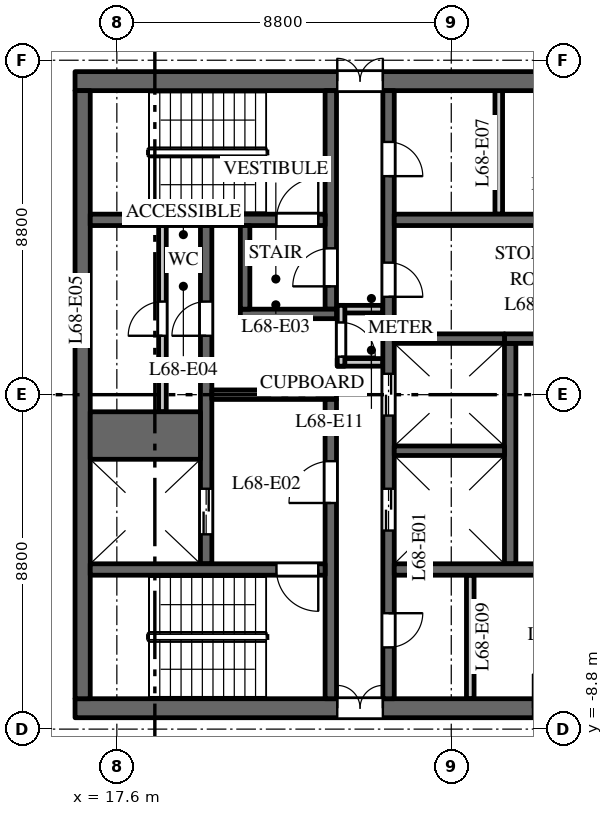
"""IFC4 building model, lengths in metres.
Left out: names, types, materials, properties, quantities, classifications, styles, units other than length and angle.
Written with IfcOpenShell. Run it as: python <this file> out.ifc"""

import sys

from ifc_helpers import new_model, si_unit, direction, frame, frame_2d, origin, place, context, subcontext, project, spatial, rectangle, extrude, element, fill, save


model = new_model("IFC4")
c1 = context("Model", 3, precision=1e-05, world=origin(), true_north=direction((0.0, 1.0)))
c2 = subcontext(c1, "Body", "Model", "MODEL_VIEW")
j1 = project(units=[si_unit("LENGTHUNIT", "METRE"), si_unit("PLANEANGLEUNIT", "RADIAN")], contexts=[c1])
p1 = place(None, origin())
s1 = spatial("IfcSite", under=j1, at=p1, CompositionType="ELEMENT")
p2 = place(p1, origin())
s2 = spatial("IfcBuilding", under=s1, at=p2, CompositionType="ELEMENT")
p3 = place(p2, frame((0.0, 0.0, 315.0)))
s3 = spatial("IfcBuildingStorey", under=s2, at=p3, CompositionType="ELEMENT", Elevation=315.0)
p4 = place(p3, frame((16.5, 8.25, 0.0), z_axis=(0.0, 0.0, 1.0), x_axis=(1.0, 0.0, 0.0)))
e1 = element("IfcWall", 1, at=p4, inside=s3, PredefinedType="SHEAR", context=c2, shape_type="SweptSolid", body=[
    extrude(rectangle(XDim=15.0, YDim=0.5, at=frame_2d((7.5, 0.0))), origin(), (0.0, 0.0, 1.0), 3.7),
])
p5 = place(p4, frame((6.9, 0.0, 0.0)))
e2 = element("IfcOpeningElement", 2, at=p5, cuts=e1, PredefinedType="OPENING", context=c2, shape_type="SweptSolid", body=[
    extrude(rectangle(XDim=1.2, YDim=2.1, at=frame_2d((0.6, 1.05))), frame((0.0, 0.26, 0.0), z_axis=(0.0, -1.0, 0.0), x_axis=(1.0, 0.0, 0.0)), (0.0, 0.0, 1.0), 0.52),
])
p6 = place(p4, frame((12.425, 0.0, 0.0)))
e3 = element("IfcOpeningElement", 3, at=p6, cuts=e1, PredefinedType="OPENING", context=c2, shape_type="SweptSolid", body=[
    extrude(rectangle(XDim=0.9, YDim=2.1, at=frame_2d((0.45, 1.05))), frame((0.0, 0.26, 0.0), z_axis=(0.0, -1.0, 0.0), x_axis=(1.0, 0.0, 0.0)), (0.0, 0.0, 1.0), 0.52),
])
p7 = place(p3, frame((16.5, -8.25, 0.0), z_axis=(0.0, 0.0, 1.0), x_axis=(1.0, 0.0, 0.0)))
e4 = element("IfcWall", 4, at=p7, inside=s3, PredefinedType="SHEAR", context=c2, shape_type="SweptSolid", body=[
    extrude(rectangle(XDim=15.0, YDim=0.5, at=frame_2d((7.5, 0.0))), origin(), (0.0, 0.0, 1.0), 3.7),
])
p8 = place(p7, frame((6.9, 0.0, 0.0)))
e5 = element("IfcOpeningElement", 5, at=p8, cuts=e4, PredefinedType="OPENING", context=c2, shape_type="SweptSolid", body=[
    extrude(rectangle(XDim=1.2, YDim=2.1, at=frame_2d((0.6, 1.05))), frame((0.0, 0.26, 0.0), z_axis=(0.0, -1.0, 0.0), x_axis=(1.0, 0.0, 0.0)), (0.0, 0.0, 1.0), 0.52),
])
p9 = place(p7, frame((12.05, 0.0, 0.0)))
e6 = element("IfcOpeningElement", 6, at=p9, cuts=e4, PredefinedType="OPENING", context=c2, shape_type="SweptSolid", body=[
    extrude(rectangle(XDim=0.9, YDim=2.1, at=frame_2d((0.45, 1.05))), frame((0.0, 0.26, 0.0), z_axis=(0.0, -1.0, 0.0), x_axis=(1.0, 0.0, 0.0)), (0.0, 0.0, 1.0), 0.52),
])
p10 = place(p3, frame((18.8, -0.45, 0.0), z_axis=(0.0, 0.0, 1.0), x_axis=(0.0, 1.0, 0.0)))
e7 = element("IfcWall", 7, at=p10, inside=s3, PredefinedType="PARTITIONING", context=c2, shape_type="SweptSolid", body=[
    extrude(rectangle(XDim=4.9, YDim=0.2, at=frame_2d((2.45, 0.0))), origin(), (0.0, 0.0, 1.0), 3.7),
])
p11 = place(p10, frame((2.0, 0.0, 0.0)))
e8 = element("IfcOpeningElement", 8, at=p11, cuts=e7, PredefinedType="OPENING", context=c2, shape_type="SweptSolid", body=[
    extrude(rectangle(XDim=0.9, YDim=2.1, at=frame_2d((0.45, 1.05))), frame((0.0, 0.11, 0.0), z_axis=(0.0, -1.0, 0.0), x_axis=(1.0, 0.0, 0.0)), (0.0, 0.0, 1.0), 0.22),
])
p12 = place(p3, frame((27.95, -4.45, 0.0), z_axis=(0.0, 0.0, 1.0), x_axis=(0.0, 1.0, 0.0)))
e9 = element("IfcWall", 9, at=p12, inside=s3, PredefinedType="SHEAR", context=c2, shape_type="SweptSolid", body=[
    extrude(rectangle(XDim=5.8, YDim=0.3, at=frame_2d((2.9, 0.0))), origin(), (0.0, 0.0, 1.0), 3.7),
])
p13 = place(p3, frame((27.8, 1.475, 0.0), z_axis=(0.0, 0.0, 1.0), x_axis=(1.0, 0.0, 0.0)))
e10 = element("IfcWall", 10, at=p13, inside=s3, PredefinedType="SHEAR", context=c2, shape_type="SweptSolid", body=[
    extrude(rectangle(XDim=3.2, YDim=0.25, at=frame_2d((1.6, 0.0))), origin(), (0.0, 0.0, 1.0), 3.7),
])
p14 = place(p3, frame((19.95, -4.45, 0.0), z_axis=(0.0, 0.0, 1.0), x_axis=(0.0, 1.0, 0.0)))
e11 = element("IfcWall", 11, at=p14, inside=s3, PredefinedType="SHEAR", context=c2, shape_type="SweptSolid", body=[
    extrude(rectangle(XDim=8.9, YDim=0.3, at=frame_2d((4.45, 0.0))), origin(), (0.0, 0.0, 1.0), 3.7),
])
p15 = place(p14, frame((0.775, 0.0, 0.0)))
e12 = element("IfcOpeningElement", 12, at=p15, cuts=e11, PredefinedType="OPENING", context=c2, shape_type="SweptSolid", body=[
    extrude(rectangle(XDim=1.2, YDim=2.1, at=frame_2d((0.6, 1.05))), frame((0.0, 0.16, 0.0), z_axis=(0.0, -1.0, 0.0), x_axis=(1.0, 0.0, 0.0)), (0.0, 0.0, 1.0), 0.32),
])
p16 = place(p14, frame((6.0, 0.0, 0.0)))
e13 = element("IfcOpeningElement", 13, at=p16, cuts=e11, PredefinedType="OPENING", context=c2, shape_type="SweptSolid", body=[
    extrude(rectangle(XDim=0.9, YDim=2.1, at=frame_2d((0.45, 1.05))), frame((0.0, 0.16, 0.0), z_axis=(0.0, -1.0, 0.0), x_axis=(1.0, 0.0, 0.0)), (0.0, 0.0, 1.0), 0.32),
])
p17 = place(p3, frame((24.75, -8.0, 0.0), z_axis=(0.0, 0.0, 1.0), x_axis=(0.0, 1.0, 0.0)))
e14 = element("IfcWall", 14, at=p17, inside=s3, PredefinedType="SHEAR", context=c2, shape_type="SweptSolid", body=[
    extrude(rectangle(XDim=16.0, YDim=0.3, at=frame_2d((8.0, 0.0))), origin(), (0.0, 0.0, 1.0), 3.7),
])
p18 = place(p17, frame((4.425, 0.0, 0.0)))
e15 = element("IfcOpeningElement", 15, at=p18, cuts=e14, PredefinedType="OPENING", context=c2, shape_type="SweptSolid", body=[
    extrude(rectangle(XDim=1.1, YDim=2.1, at=frame_2d((0.55, 1.05))), frame((0.0, 0.16, 0.0), z_axis=(0.0, -1.0, 0.0), x_axis=(1.0, 0.0, 0.0)), (0.0, 0.0, 1.0), 0.32),
])
p19 = place(p17, frame((7.45, 0.0, 0.0)))
e16 = element("IfcOpeningElement", 16, at=p19, cuts=e14, PredefinedType="OPENING", context=c2, shape_type="SweptSolid", body=[
    extrude(rectangle(XDim=1.1, YDim=2.1, at=frame_2d((0.55, 1.05))), frame((0.0, 0.16, 0.0), z_axis=(0.0, -1.0, 0.0), x_axis=(1.0, 0.0, 0.0)), (0.0, 0.0, 1.0), 0.32),
])
p20 = place(p17, frame((10.575, 0.0, 0.0)))
e17 = element("IfcOpeningElement", 17, at=p20, cuts=e14, PredefinedType="OPENING", context=c2, shape_type="SweptSolid", body=[
    extrude(rectangle(XDim=0.9, YDim=2.1, at=frame_2d((0.45, 1.05))), frame((0.0, 0.16, 0.0), z_axis=(0.0, -1.0, 0.0), x_axis=(1.0, 0.0, 0.0)), (0.0, 0.0, 1.0), 0.32),
])
p21 = place(p17, frame((13.75, 0.0, 0.0)))
e18 = element("IfcOpeningElement", 18, at=p21, cuts=e14, PredefinedType="OPENING", context=c2, shape_type="SweptSolid", body=[
    extrude(rectangle(XDim=0.9, YDim=2.1, at=frame_2d((0.45, 1.05))), frame((0.0, 0.16, 0.0), z_axis=(0.0, -1.0, 0.0), x_axis=(1.0, 0.0, 0.0)), (0.0, 0.0, 1.0), 0.32),
])
p22 = place(p17, frame((1.35, 0.0, 0.0)))
e19 = element("IfcOpeningElement", 19, at=p22, cuts=e14, PredefinedType="OPENING", context=c2, shape_type="SweptSolid", body=[
    extrude(rectangle(XDim=0.9, YDim=2.1, at=frame_2d((0.45, 1.05))), frame((0.0, 0.16, 0.0), z_axis=(0.0, -1.0, 0.0), x_axis=(1.0, 0.0, 0.0)), (0.0, 0.0, 1.0), 0.32),
])
p23 = place(p3, frame((20.1, 0.0, 0.0), z_axis=(0.0, 0.0, 1.0), x_axis=(1.0, 0.0, 0.0)))
e20 = element("IfcWall", 20, at=p23, inside=s3, PredefinedType="SHEAR", context=c2, shape_type="SweptSolid", body=[
    extrude(rectangle(XDim=3.28, YDim=0.25, at=frame_2d((1.64, 0.0))), origin(), (0.0, 0.0, 1.0), 3.7),
])
p24 = place(p3, frame((16.7, -8.0, 0.0), z_axis=(0.0, 0.0, 1.0), x_axis=(0.0, 1.0, 0.0)))
e21 = element("IfcWall", 21, at=p24, inside=s3, PredefinedType="SHEAR", context=c2, shape_type="SweptSolid", body=[
    extrude(rectangle(XDim=16.0, YDim=0.4, at=frame_2d((8.0, 0.0))), origin(), (0.0, 0.0, 1.0), 3.7),
])
for number, where, z_axis, x_axis in (
    (22, (23.4, 0.85, 0.0), (0.0, 0.0, 1.0), (1.0, 0.0, 0.0)),
    (23, (23.4, 2.25, 0.0), (0.0, 0.0, 1.0), (1.0, 0.0, 0.0)),
):
    element("IfcWall", number, at=place(p3, frame(where, z_axis=z_axis, x_axis=x_axis)), inside=s3, PredefinedType="PARTITIONING", context=c2, shape_type="SweptSolid", body=[
        extrude(rectangle(XDim=1.2, YDim=0.2, at=frame_2d((0.6, 0.0))), origin(), (0.0, 0.0, 1.0), 3.7),
    ])
p25 = place(p3, frame((23.5, 0.75, 0.0), z_axis=(0.0, 0.0, 1.0), x_axis=(0.0, 1.0, 0.0)))
e24 = element("IfcWall", 24, at=p25, inside=s3, PredefinedType="PARTITIONING", context=c2, shape_type="SweptSolid", body=[
    extrude(rectangle(XDim=1.6, YDim=0.2, at=frame_2d((0.8, 0.0))), origin(), (0.0, 0.0, 1.0), 3.7),
])
p26 = place(p25, frame((0.25, 0.0, 0.0)))
e25 = element("IfcOpeningElement", 25, at=p26, cuts=e24, PredefinedType="OPENING", context=c2, shape_type="SweptSolid", body=[
    extrude(rectangle(XDim=0.9, YDim=2.1, at=frame_2d((0.45, 1.05))), frame((0.0, 0.11, 0.0), z_axis=(0.0, -1.0, 0.0), x_axis=(1.0, 0.0, 0.0)), (0.0, 0.0, 1.0), 0.22),
])
p27 = place(p3, frame((24.9, 4.6, 0.0), z_axis=(0.0, 0.0, 1.0), x_axis=(1.0, 0.0, 0.0)))
e26 = element("IfcWall", 26, at=p27, inside=s3, PredefinedType="SHEAR", context=c2, shape_type="SweptSolid", body=[
    extrude(rectangle(XDim=6.1, YDim=0.3, at=frame_2d((3.05, 0.0))), origin(), (0.0, 0.0, 1.0), 3.7),
])
for number, where, z_axis, x_axis in (
    (27, (27.65, 4.75, 0.0), (0.0, 0.0, 1.0), (0.0, 1.0, 0.0)),
    (28, (26.9, -8.0, 0.0), (0.0, 0.0, 1.0), (0.0, 1.0, 0.0)),
):
    element("IfcWall", number, at=place(p3, frame(where, z_axis=z_axis, x_axis=x_axis)), inside=s3, PredefinedType="PARTITIONING", context=c2, shape_type="SweptSolid", body=[
        extrude(rectangle(XDim=3.25, YDim=0.2, at=frame_2d((1.625, 0.0))), origin(), (0.0, 0.0, 1.0), 3.7),
    ])
p28 = place(p3, frame((24.9, -4.6, 0.0), z_axis=(0.0, 0.0, 1.0), x_axis=(1.0, 0.0, 0.0)))
e29 = element("IfcWall", 29, at=p28, inside=s3, PredefinedType="SHEAR", context=c2, shape_type="SweptSolid", body=[
    extrude(rectangle(XDim=6.1, YDim=0.3, at=frame_2d((3.05, 0.0))), origin(), (0.0, 0.0, 1.0), 3.7),
])
p29 = place(p28, frame((4.2, 0.0, 0.0)))
e30 = element("IfcOpeningElement", 30, at=p29, cuts=e29, PredefinedType="OPENING", context=c2, shape_type="SweptSolid", body=[
    extrude(rectangle(XDim=0.9, YDim=2.1, at=frame_2d((0.45, 1.05))), frame((0.0, 0.16, 0.0), z_axis=(0.0, -1.0, 0.0), x_axis=(1.0, 0.0, 0.0)), (0.0, 0.0, 1.0), 0.32),
])
p30 = place(p3, frame((16.9, -1.075, 0.0), z_axis=(0.0, 0.0, 1.0), x_axis=(1.0, 0.0, 0.0)))
e31 = element("IfcWall", 31, at=p30, inside=s3, PredefinedType="SHEAR", context=c2, shape_type="SweptSolid", body=[
    extrude(rectangle(XDim=2.9, YDim=1.25, at=frame_2d((1.45, 0.0))), origin(), (0.0, 0.0, 1.0), 3.7),
])
for number, where, z_axis, x_axis in (
    (32, (24.9, -1.475, 0.0), (0.0, 0.0, 1.0), (1.0, 0.0, 0.0)),
    (33, (24.9, 1.475, 0.0), (0.0, 0.0, 1.0), (1.0, 0.0, 0.0)),
):
    element("IfcWall", number, at=place(p3, frame(where, z_axis=z_axis, x_axis=x_axis)), inside=s3, PredefinedType="SHEAR", context=c2, shape_type="SweptSolid", body=[
        extrude(rectangle(XDim=2.9, YDim=0.25, at=frame_2d((1.45, 0.0))), origin(), (0.0, 0.0, 1.0), 3.7),
    ])
p31 = place(p3, frame((23.23, 2.25, 0.0), z_axis=(0.0, 0.0, 1.0), x_axis=(0.0, 1.0, 0.0)))
e34 = element("IfcWall", 34, at=p31, inside=s3, PredefinedType="SHEAR", context=c2, shape_type="SweptSolid", body=[
    extrude(rectangle(XDim=5.75, YDim=0.3, at=frame_2d((2.875, 0.0))), origin(), (0.0, 0.0, 1.0), 3.7),
])
p32 = place(p31, frame((0.6, 0.0, 0.0)))
e35 = element("IfcOpeningElement", 35, at=p32, cuts=e34, PredefinedType="OPENING", context=c2, shape_type="SweptSolid", body=[
    extrude(rectangle(XDim=1.0, YDim=2.1, at=frame_2d((0.5, 1.05))), frame((0.0, 0.16, 0.0), z_axis=(0.0, -1.0, 0.0), x_axis=(1.0, 0.0, 0.0)), (0.0, 0.0, 1.0), 0.32),
])
p33 = place(p3, frame((23.23, -8.0, 0.0), z_axis=(0.0, 0.0, 1.0), x_axis=(0.0, 1.0, 0.0)))
e36 = element("IfcWall", 36, at=p33, inside=s3, PredefinedType="SHEAR", context=c2, shape_type="SweptSolid", body=[
    extrude(rectangle(XDim=7.875, YDim=0.3, at=frame_2d((3.938, 0.0))), origin(), (0.0, 0.0, 1.0), 3.7),
])
p34 = place(p33, frame((5.15, 0.0, 0.0)))
e37 = element("IfcOpeningElement", 37, at=p34, cuts=e36, PredefinedType="OPENING", context=c2, shape_type="SweptSolid", body=[
    extrude(rectangle(XDim=1.1, YDim=2.1, at=frame_2d((0.55, 1.05))), frame((0.0, 0.16, 0.0), z_axis=(0.0, -1.0, 0.0), x_axis=(1.0, 0.0, 0.0)), (0.0, 0.0, 1.0), 0.32),
])
p35 = place(p3, frame((16.9, 4.6, 0.0), z_axis=(0.0, 0.0, 1.0), x_axis=(1.0, 0.0, 0.0)))
e38 = element("IfcWall", 38, at=p35, inside=s3, PredefinedType="SHEAR", context=c2, shape_type="SweptSolid", body=[
    extrude(rectangle(XDim=6.18, YDim=0.3, at=frame_2d((3.09, 0.0))), origin(), (0.0, 0.0, 1.0), 3.7),
])
p36 = place(p35, frame((4.9, 0.0, 0.0)))
e39 = element("IfcOpeningElement", 39, at=p36, cuts=e38, PredefinedType="OPENING", context=c2, shape_type="SweptSolid", body=[
    extrude(rectangle(XDim=1.1, YDim=2.1, at=frame_2d((0.55, 1.05))), frame((0.0, 0.16, 0.0), z_axis=(0.0, -1.0, 0.0), x_axis=(1.0, 0.0, 0.0)), (0.0, 0.0, 1.0), 0.32),
])
p37 = place(p3, frame((16.9, -4.6, 0.0), z_axis=(0.0, 0.0, 1.0), x_axis=(1.0, 0.0, 0.0)))
e40 = element("IfcWall", 40, at=p37, inside=s3, PredefinedType="SHEAR", context=c2, shape_type="SweptSolid", body=[
    extrude(rectangle(XDim=6.18, YDim=0.3, at=frame_2d((3.09, 0.0))), origin(), (0.0, 0.0, 1.0), 3.7),
])
p38 = place(p37, frame((4.9, 0.0, 0.0)))
e41 = element("IfcOpeningElement", 41, at=p38, cuts=e40, PredefinedType="OPENING", context=c2, shape_type="SweptSolid", body=[
    extrude(rectangle(XDim=1.1, YDim=2.1, at=frame_2d((0.55, 1.05))), frame((0.0, 0.16, 0.0), z_axis=(0.0, -1.0, 0.0), x_axis=(1.0, 0.0, 0.0)), (0.0, 0.0, 1.0), 0.32),
])
p39 = place(p3, frame((20.85, 2.125, 0.0), z_axis=(0.0, 0.0, 1.0), x_axis=(1.0, 0.0, 0.0)))
e42 = element("IfcWall", 42, at=p39, inside=s3, PredefinedType="SHEAR", context=c2, shape_type="SweptSolid", body=[
    extrude(rectangle(XDim=2.53, YDim=0.25, at=frame_2d((1.265, 0.0))), origin(), (0.0, 0.0, 1.0), 3.7),
])
p40 = place(p3, frame((20.975, 2.25, 0.0), z_axis=(0.0, 0.0, 1.0), x_axis=(0.0, 1.0, 0.0)))
e43 = element("IfcWall", 43, at=p40, inside=s3, PredefinedType="SHEAR", context=c2, shape_type="SweptSolid", body=[
    extrude(rectangle(XDim=2.2, YDim=0.25, at=frame_2d((1.1, 0.0))), origin(), (0.0, 0.0, 1.0), 3.7),
])
p41 = place(p15, origin())
e44 = element("IfcDoor", 44, at=p41, inside=s3, OperationType="DOUBLE_DOOR_SLIDING", PredefinedType="DOOR", context=c2, shape_type="SweptSolid", body=[
    extrude(rectangle(XDim=1.2, YDim=2.1, at=frame_2d((0.6, 1.05))), frame((0.0, 0.025, 0.0), z_axis=(0.0, -1.0, 0.0), x_axis=(1.0, 0.0, 0.0)), (0.0, 0.0, 1.0), 0.05),
])
fill(e12, e44)
p42 = place(p18, origin())
e45 = element("IfcDoor", 45, at=p42, inside=s3, OperationType="DOUBLE_DOOR_SLIDING", PredefinedType="DOOR", context=c2, shape_type="SweptSolid", body=[
    extrude(rectangle(XDim=1.1, YDim=2.1, at=frame_2d((0.55, 1.05))), frame((0.0, 0.025, 0.0), z_axis=(0.0, -1.0, 0.0), x_axis=(1.0, 0.0, 0.0)), (0.0, 0.0, 1.0), 0.05),
])
fill(e15, e45)
p43 = place(p19, origin())
e46 = element("IfcDoor", 46, at=p43, inside=s3, OperationType="DOUBLE_DOOR_SLIDING", PredefinedType="DOOR", context=c2, shape_type="SweptSolid", body=[
    extrude(rectangle(XDim=1.1, YDim=2.1, at=frame_2d((0.55, 1.05))), frame((0.0, 0.025, 0.0), z_axis=(0.0, -1.0, 0.0), x_axis=(1.0, 0.0, 0.0)), (0.0, 0.0, 1.0), 0.05),
])
fill(e16, e46)
p44 = place(p36, origin())
e47 = element("IfcDoor", 47, at=p44, inside=s3, OperationType="SINGLE_SWING_LEFT", PredefinedType="DOOR", context=c2, shape_type="SweptSolid", body=[
    extrude(rectangle(XDim=1.1, YDim=2.1, at=frame_2d((0.55, 1.05))), frame((0.0, 0.025, 0.0), z_axis=(0.0, -1.0, 0.0), x_axis=(1.0, 0.0, 0.0)), (0.0, 0.0, 1.0), 0.05),
])
fill(e39, e47)
p45 = place(p38, origin())
e48 = element("IfcDoor", 48, at=p45, inside=s3, OperationType="SINGLE_SWING_RIGHT", PredefinedType="DOOR", context=c2, shape_type="SweptSolid", body=[
    extrude(rectangle(XDim=1.1, YDim=2.1, at=frame_2d((0.55, 1.05))), frame((0.0, 0.025, 0.0), z_axis=(0.0, -1.0, 0.0), x_axis=(1.0, 0.0, 0.0)), (0.0, 0.0, 1.0), 0.05),
])
fill(e41, e48)
p46 = place(p34, origin())
e49 = element("IfcDoor", 49, at=p46, inside=s3, OperationType="SINGLE_SWING_RIGHT", PredefinedType="DOOR", context=c2, shape_type="SweptSolid", body=[
    extrude(rectangle(XDim=1.1, YDim=2.1, at=frame_2d((0.55, 1.05))), frame((0.0, 0.025, 0.0), z_axis=(0.0, -1.0, 0.0), x_axis=(1.0, 0.0, 0.0)), (0.0, 0.0, 1.0), 0.05),
])
fill(e37, e49)
p47 = place(p32, origin())
e50 = element("IfcDoor", 50, at=p47, inside=s3, OperationType="SINGLE_SWING_RIGHT", PredefinedType="DOOR", context=c2, shape_type="SweptSolid", body=[
    extrude(rectangle(XDim=1.0, YDim=2.1, at=frame_2d((0.5, 1.05))), frame((0.0, 0.025, 0.0), z_axis=(0.0, -1.0, 0.0), x_axis=(1.0, 0.0, 0.0)), (0.0, 0.0, 1.0), 0.05),
])
fill(e35, e50)
p48 = place(p5, origin())
e51 = element("IfcDoor", 51, at=p48, inside=s3, OperationType="DOUBLE_DOOR_DOUBLE_SWING", PredefinedType="DOOR", context=c2, shape_type="SweptSolid", body=[
    extrude(rectangle(XDim=1.2, YDim=2.1, at=frame_2d((0.6, 1.05))), frame((0.0, 0.025, 0.0), z_axis=(0.0, -1.0, 0.0), x_axis=(1.0, 0.0, 0.0)), (0.0, 0.0, 1.0), 0.05),
])
fill(e2, e51)
p49 = place(p8, origin())
e52 = element("IfcDoor", 52, at=p49, inside=s3, OperationType="DOUBLE_DOOR_DOUBLE_SWING", PredefinedType="DOOR", context=c2, shape_type="SweptSolid", body=[
    extrude(rectangle(XDim=1.2, YDim=2.1, at=frame_2d((0.6, 1.05))), frame((0.0, 0.025, 0.0), z_axis=(0.0, -1.0, 0.0), x_axis=(1.0, 0.0, 0.0)), (0.0, 0.0, 1.0), 0.05),
])
fill(e5, e52)
p50 = place(p16, origin())
e53 = element("IfcDoor", 53, at=p50, inside=s3, OperationType="SINGLE_SWING_RIGHT", PredefinedType="DOOR", context=c2, shape_type="SweptSolid", body=[
    extrude(rectangle(XDim=0.9, YDim=2.1, at=frame_2d((0.45, 1.05))), frame((0.0, 0.025, 0.0), z_axis=(0.0, -1.0, 0.0), x_axis=(1.0, 0.0, 0.0)), (0.0, 0.0, 1.0), 0.05),
])
fill(e13, e53)
p51 = place(p11, origin())
e54 = element("IfcDoor", 54, at=p51, inside=s3, OperationType="SINGLE_SWING_RIGHT", PredefinedType="DOOR", context=c2, shape_type="SweptSolid", body=[
    extrude(rectangle(XDim=0.9, YDim=2.1, at=frame_2d((0.45, 1.05))), frame((0.0, 0.025, 0.0), z_axis=(0.0, -1.0, 0.0), x_axis=(1.0, 0.0, 0.0)), (0.0, 0.0, 1.0), 0.05),
])
fill(e8, e54)
p52 = place(p20, origin())
e55 = element("IfcDoor", 55, at=p52, inside=s3, OperationType="SINGLE_SWING_LEFT", PredefinedType="DOOR", context=c2, shape_type="SweptSolid", body=[
    extrude(rectangle(XDim=0.9, YDim=2.1, at=frame_2d((0.45, 1.05))), frame((0.0, 0.025, 0.0), z_axis=(0.0, -1.0, 0.0), x_axis=(1.0, 0.0, 0.0)), (0.0, 0.0, 1.0), 0.05),
])
fill(e17, e55)
p53 = place(p21, origin())
e56 = element("IfcDoor", 56, at=p53, inside=s3, OperationType="SINGLE_SWING_LEFT", PredefinedType="DOOR", context=c2, shape_type="SweptSolid", body=[
    extrude(rectangle(XDim=0.9, YDim=2.1, at=frame_2d((0.45, 1.05))), frame((0.0, 0.025, 0.0), z_axis=(0.0, -1.0, 0.0), x_axis=(1.0, 0.0, 0.0)), (0.0, 0.0, 1.0), 0.05),
])
fill(e18, e56)
p54 = place(p22, origin())
e57 = element("IfcDoor", 57, at=p54, inside=s3, OperationType="SINGLE_SWING_RIGHT", PredefinedType="DOOR", context=c2, shape_type="SweptSolid", body=[
    extrude(rectangle(XDim=0.9, YDim=2.1, at=frame_2d((0.45, 1.05))), frame((0.0, 0.025, 0.0), z_axis=(0.0, -1.0, 0.0), x_axis=(1.0, 0.0, 0.0)), (0.0, 0.0, 1.0), 0.05),
])
fill(e19, e57)
p55 = place(p26, origin())
e58 = element("IfcDoor", 58, at=p55, inside=s3, OperationType="SINGLE_SWING_LEFT", PredefinedType="DOOR", context=c2, shape_type="SweptSolid", body=[
    extrude(rectangle(XDim=0.9, YDim=2.1, at=frame_2d((0.45, 1.05))), frame((0.0, 0.025, 0.0), z_axis=(0.0, -1.0, 0.0), x_axis=(1.0, 0.0, 0.0)), (0.0, 0.0, 1.0), 0.05),
])
fill(e25, e58)
save(model, sys.argv[1])
